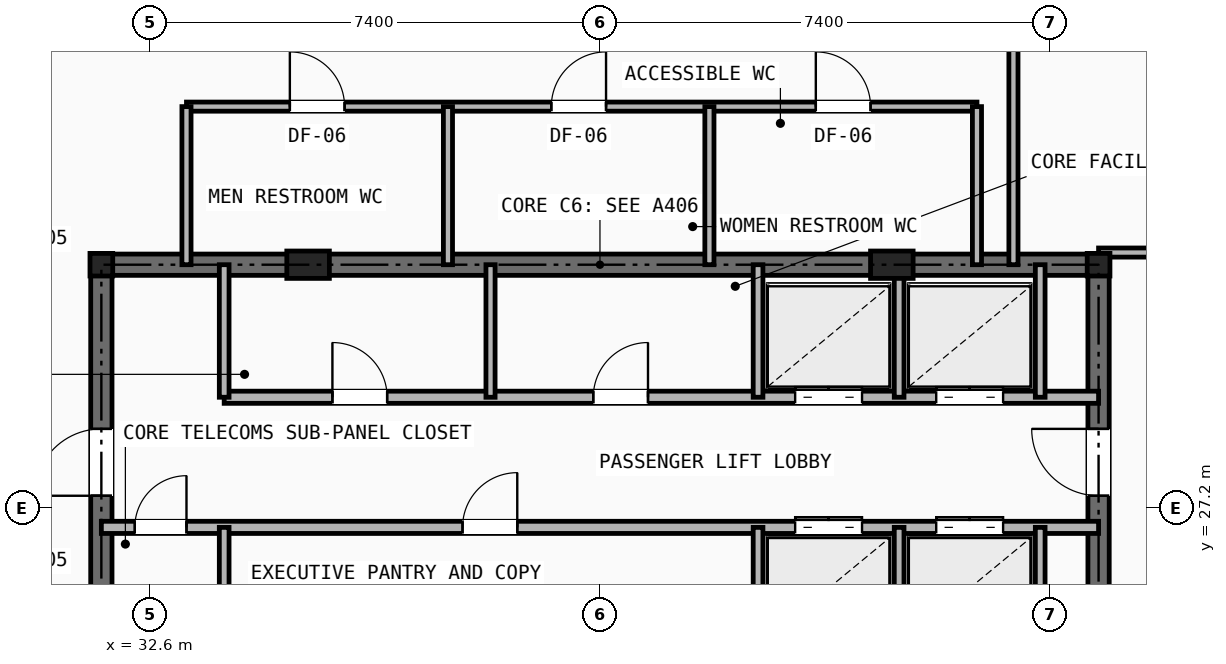
"""IFC4 building model, lengths in metres.
Left out: names, types, materials, properties, quantities, classifications, styles, units other than length and angle.
Written with IfcOpenShell. Run it as: python <this file> out.ifc"""

import sys

from ifc_helpers import new_model, si_unit, direction, frame, frame_2d, origin, origin_2d, place, context, subcontext, project, spatial, rectangle, i_section, extrude, element, fill, save


model = new_model("IFC4")
c1 = context("Model", 3, precision=1e-05, world=origin(), true_north=direction((0.0, 1.0)))
c2 = subcontext(c1, "Body", "Model", "MODEL_VIEW")
j1 = project(units=[si_unit("LENGTHUNIT", "METRE"), si_unit("PLANEANGLEUNIT", "RADIAN")], contexts=[c1])
p1 = place(None, origin())
s1 = spatial("IfcSite", under=j1, at=p1, CompositionType="ELEMENT")
p2 = place(p1, origin())
s2 = spatial("IfcBuilding", under=s1, at=p2, CompositionType="ELEMENT")
p3 = place(p2, frame((0.0, 0.0, 208.4)))
s3 = spatial("IfcBuildingStorey", under=s2, at=p3, CompositionType="ELEMENT", Elevation=208.4)
for number, where, z_axis, x_axis in (
    (1, (31.8, 31.2, 0.0), (0.0, 0.0, 1.0), (1.0, 0.0, 0.0)),
    (2, (48.2, 31.2, 0.0), (0.0, 0.0, 1.0), (1.0, 0.0, 0.0)),
):
    element("IfcColumn", number, at=place(p3, frame(where, z_axis=z_axis, x_axis=x_axis)), inside=s3, PredefinedType="COLUMN", context=c2, shape_type="SweptSolid", body=[
        extrude(i_section(OverallWidth=0.374, OverallDepth=0.372, WebThickness=0.016, FlangeThickness=0.026, at=origin_2d()), origin(), (0.0, 0.0, 1.0), 3.5),
    ])
for number, where, z_axis, x_axis in (
    (3, (35.2, 31.2, 0.0), (0.0, 0.0, 1.0), (1.0, 0.0, 0.0)),
    (4, (44.8, 31.2, 0.0), (0.0, 0.0, 1.0), (1.0, 0.0, 0.0)),
):
    element("IfcColumn", number, at=place(p3, frame(where, z_axis=z_axis, x_axis=x_axis)), inside=s3, PredefinedType="PILASTER", context=c2, shape_type="SweptSolid", body=[
        extrude(rectangle(XDim=0.7, YDim=0.45, at=origin_2d()), origin(), (0.0, 0.0, 1.0), 3.5),
    ])
p4 = place(p3, frame((31.8, 31.2, 0.0), z_axis=(0.0, 0.0, 1.0), x_axis=(1.0, 0.0, 0.0)))
e5 = element("IfcWall", 5, at=p4, inside=s3, PredefinedType="SHEAR", context=c2, shape_type="SweptSolid", body=[
    extrude(rectangle(XDim=16.4, YDim=0.35, at=frame_2d((8.2, 0.0))), origin(), (0.0, 0.0, 1.0), 3.25),
])
p5 = place(p3, frame((31.8, 16.4, 0.0), z_axis=(0.0, 0.0, 1.0), x_axis=(0.0, 1.0, 0.0)))
e6 = element("IfcWall", 6, at=p5, inside=s3, PredefinedType="SHEAR", context=c2, shape_type="SweptSolid", body=[
    extrude(rectangle(XDim=14.8, YDim=0.35, at=frame_2d((7.4, 0.0))), origin(), (0.0, 0.0, 1.0), 3.25),
])
p6 = place(p5, frame((11.0, 0.0, 0.0)))
e7 = element("IfcOpeningElement", 7, at=p6, cuts=e6, PredefinedType="OPENING", context=c2, shape_type="SweptSolid", body=[
    extrude(rectangle(XDim=1.1, YDim=2.15, at=frame_2d((0.55, 1.075))), frame((0.0, 0.185, 0.0), z_axis=(0.0, -1.0, 0.0), x_axis=(1.0, 0.0, 0.0)), (0.0, 0.0, 1.0), 0.37),
])
p7 = place(p3, frame((48.2, 16.4, 0.0), z_axis=(0.0, 0.0, 1.0), x_axis=(0.0, 1.0, 0.0)))
e8 = element("IfcWall", 8, at=p7, inside=s3, PredefinedType="SHEAR", context=c2, shape_type="SweptSolid", body=[
    extrude(rectangle(XDim=14.8, YDim=0.35, at=frame_2d((7.4, 0.0))), origin(), (0.0, 0.0, 1.0), 3.25),
])
p8 = place(p7, frame((11.0, 0.0, 0.0)))
e9 = element("IfcOpeningElement", 9, at=p8, cuts=e8, PredefinedType="OPENING", context=c2, shape_type="SweptSolid", body=[
    extrude(rectangle(XDim=1.1, YDim=2.15, at=frame_2d((0.55, 1.075))), frame((0.0, 0.185, 0.0), z_axis=(0.0, -1.0, 0.0), x_axis=(1.0, 0.0, 0.0)), (0.0, 0.0, 1.0), 0.37),
])
p9 = place(p3, frame((33.82, 29.02, 0.0), z_axis=(0.0, 0.0, 1.0), x_axis=(1.0, 0.0, 0.0)))
e10 = element("IfcWall", 10, at=p9, inside=s3, PredefinedType="SOLIDWALL", context=c2, shape_type="SweptSolid", body=[
    extrude(rectangle(XDim=14.38, YDim=0.2, at=frame_2d((7.19, 0.0))), origin(), (0.0, 0.0, 1.0), 2.705),
])
p10 = place(p9, frame((1.78, 0.0, 0.0)))
e11 = element("IfcOpeningElement", 11, at=p10, cuts=e10, PredefinedType="OPENING", context=c2, shape_type="SweptSolid", body=[
    extrude(rectangle(XDim=0.9, YDim=2.1, at=frame_2d((0.45, 1.05))), frame((0.0, 0.11, 0.0), z_axis=(0.0, -1.0, 0.0), x_axis=(1.0, 0.0, 0.0)), (0.0, 0.0, 1.0), 0.22),
])
p11 = place(p9, frame((6.07, 0.0, 0.0)))
e12 = element("IfcOpeningElement", 12, at=p11, cuts=e10, PredefinedType="OPENING", context=c2, shape_type="SweptSolid", body=[
    extrude(rectangle(XDim=0.9, YDim=2.1, at=frame_2d((0.45, 1.05))), frame((0.0, 0.11, 0.0), z_axis=(0.0, -1.0, 0.0), x_axis=(1.0, 0.0, 0.0)), (0.0, 0.0, 1.0), 0.22),
])
p12 = place(p9, frame((9.39, 0.0, 0.0)))
e13 = element("IfcOpeningElement", 13, at=p12, cuts=e10, PredefinedType="OPENING", context=c2, shape_type="SweptSolid", body=[
    extrude(rectangle(XDim=1.1, YDim=2.15, at=frame_2d((0.55, 1.075))), frame((0.0, 0.11, 0.0), z_axis=(0.0, -1.0, 0.0), x_axis=(1.0, 0.0, 0.0)), (0.0, 0.0, 1.0), 0.22),
])
p13 = place(p9, frame((11.71, 0.0, 0.0)))
e14 = element("IfcOpeningElement", 14, at=p13, cuts=e10, PredefinedType="OPENING", context=c2, shape_type="SweptSolid", body=[
    extrude(rectangle(XDim=1.1, YDim=2.15, at=frame_2d((0.55, 1.075))), frame((0.0, 0.11, 0.0), z_axis=(0.0, -1.0, 0.0), x_axis=(1.0, 0.0, 0.0)), (0.0, 0.0, 1.0), 0.22),
])
p14 = place(p3, frame((31.8, 26.88, 0.0), z_axis=(0.0, 0.0, 1.0), x_axis=(1.0, 0.0, 0.0)))
e15 = element("IfcWall", 15, at=p14, inside=s3, PredefinedType="SOLIDWALL", context=c2, shape_type="SweptSolid", body=[
    extrude(rectangle(XDim=16.4, YDim=0.2, at=frame_2d((8.2, 0.0))), origin(), (0.0, 0.0, 1.0), 2.705),
])
p15 = place(p14, frame((0.55, 0.0, 0.0)))
e16 = element("IfcOpeningElement", 16, at=p15, cuts=e15, PredefinedType="OPENING", context=c2, shape_type="SweptSolid", body=[
    extrude(rectangle(XDim=0.85, YDim=2.05, at=frame_2d((0.425, 1.025))), frame((0.0, 0.11, 0.0), z_axis=(0.0, -1.0, 0.0), x_axis=(1.0, 0.0, 0.0)), (0.0, 0.0, 1.0), 0.22),
])
p16 = place(p14, frame((5.94, 0.0, 0.0)))
e17 = element("IfcOpeningElement", 17, at=p16, cuts=e15, PredefinedType="OPENING", context=c2, shape_type="SweptSolid", body=[
    extrude(rectangle(XDim=0.9, YDim=2.1, at=frame_2d((0.45, 1.05))), frame((0.0, 0.11, 0.0), z_axis=(0.0, -1.0, 0.0), x_axis=(1.0, 0.0, 0.0)), (0.0, 0.0, 1.0), 0.22),
])
p17 = place(p14, frame((11.41, 0.0, 0.0)))
e18 = element("IfcOpeningElement", 18, at=p17, cuts=e15, PredefinedType="OPENING", context=c2, shape_type="SweptSolid", body=[
    extrude(rectangle(XDim=1.1, YDim=2.15, at=frame_2d((0.55, 1.075))), frame((0.0, 0.11, 0.0), z_axis=(0.0, -1.0, 0.0), x_axis=(1.0, 0.0, 0.0)), (0.0, 0.0, 1.0), 0.22),
])
p18 = place(p14, frame((13.73, 0.0, 0.0)))
e19 = element("IfcOpeningElement", 19, at=p18, cuts=e15, PredefinedType="OPENING", context=c2, shape_type="SweptSolid", body=[
    extrude(rectangle(XDim=1.1, YDim=2.15, at=frame_2d((0.55, 1.075))), frame((0.0, 0.11, 0.0), z_axis=(0.0, -1.0, 0.0), x_axis=(1.0, 0.0, 0.0)), (0.0, 0.0, 1.0), 0.22),
])
p19 = place(p3, frame((33.82, 29.02, 0.0), z_axis=(0.0, 0.0, 1.0), x_axis=(0.0, 1.0, 0.0)))
e20 = element("IfcWall", 20, at=p19, inside=s3, PredefinedType="SOLIDWALL", context=c2, shape_type="SweptSolid", body=[
    extrude(rectangle(XDim=2.18, YDim=0.16, at=frame_2d((1.09, 0.0))), origin(), (0.0, 0.0, 1.0), 2.705),
])
p20 = place(p3, frame((33.82, 24.8, 0.0), z_axis=(0.0, 0.0, 1.0), x_axis=(0.0, 1.0, 0.0)))
e21 = element("IfcWall", 21, at=p20, inside=s3, PredefinedType="SOLIDWALL", context=c2, shape_type="SweptSolid", body=[
    extrude(rectangle(XDim=2.08, YDim=0.16, at=frame_2d((1.04, 0.0))), origin(), (0.0, 0.0, 1.0), 3.25),
])
p21 = place(p3, frame((38.2, 29.02, 0.0), z_axis=(0.0, 0.0, 1.0), x_axis=(0.0, 1.0, 0.0)))
e22 = element("IfcWall", 22, at=p21, inside=s3, PredefinedType="PARTITIONING", context=c2, shape_type="SweptSolid", body=[
    extrude(rectangle(XDim=2.18, YDim=0.15, at=frame_2d((1.09, 0.0))), origin(), (0.0, 0.0, 1.0), 2.705),
])
for number, where, z_axis, x_axis in (
    (23, (42.6, 29.02, 0.0), (0.0, 0.0, 1.0), (0.0, 1.0, 0.0)),
    (24, (44.92, 29.02, 0.0), (0.0, 0.0, 1.0), (0.0, 1.0, 0.0)),
    (25, (47.24, 29.02, 0.0), (0.0, 0.0, 1.0), (0.0, 1.0, 0.0)),
):
    element("IfcWall", number, at=place(p3, frame(where, z_axis=z_axis, x_axis=x_axis)), inside=s3, PredefinedType="SOLIDWALL", context=c2, shape_type="SweptSolid", body=[
        extrude(rectangle(XDim=2.18, YDim=0.16, at=frame_2d((1.09, 0.0))), origin(), (0.0, 0.0, 1.0), 2.705),
    ])
for number, where, z_axis, x_axis in (
    (26, (42.6, 24.8, 0.0), (0.0, 0.0, 1.0), (0.0, 1.0, 0.0)),
    (27, (44.92, 24.8, 0.0), (0.0, 0.0, 1.0), (0.0, 1.0, 0.0)),
    (28, (47.24, 24.8, 0.0), (0.0, 0.0, 1.0), (0.0, 1.0, 0.0)),
):
    element("IfcWall", number, at=place(p3, frame(where, z_axis=z_axis, x_axis=x_axis)), inside=s3, PredefinedType="SOLIDWALL", context=c2, shape_type="SweptSolid", body=[
        extrude(rectangle(XDim=2.08, YDim=0.16, at=frame_2d((1.04, 0.0))), origin(), (0.0, 0.0, 1.0), 3.25),
    ])
p22 = place(p3, frame((33.2, 33.8, 0.0), z_axis=(0.0, 0.0, 1.0), x_axis=(1.0, 0.0, 0.0)))
e29 = element("IfcWall", 29, at=p22, inside=s3, PredefinedType="PARTITIONING", context=c2, shape_type="SweptSolid", body=[
    extrude(rectangle(XDim=13.0, YDim=0.15, at=frame_2d((6.5, 0.0))), origin(), (0.0, 0.0, 1.0), 3.25),
])
p23 = place(p22, frame((1.7, 0.0, 0.0)))
e30 = element("IfcOpeningElement", 30, at=p23, cuts=e29, PredefinedType="OPENING", context=c2, shape_type="SweptSolid", body=[
    extrude(rectangle(XDim=0.9, YDim=2.1, at=frame_2d((0.45, 1.05))), frame((0.0, 0.085, 0.0), z_axis=(0.0, -1.0, 0.0), x_axis=(1.0, 0.0, 0.0)), (0.0, 0.0, 1.0), 0.17),
])
p24 = place(p22, frame((6.0, 0.0, 0.0)))
e31 = element("IfcOpeningElement", 31, at=p24, cuts=e29, PredefinedType="OPENING", context=c2, shape_type="SweptSolid", body=[
    extrude(rectangle(XDim=0.9, YDim=2.1, at=frame_2d((0.45, 1.05))), frame((0.0, 0.085, 0.0), z_axis=(0.0, -1.0, 0.0), x_axis=(1.0, 0.0, 0.0)), (0.0, 0.0, 1.0), 0.17),
])
p25 = place(p22, frame((10.35, 0.0, 0.0)))
e32 = element("IfcOpeningElement", 32, at=p25, cuts=e29, PredefinedType="OPENING", context=c2, shape_type="SweptSolid", body=[
    extrude(rectangle(XDim=0.9, YDim=2.1, at=frame_2d((0.45, 1.05))), frame((0.0, 0.085, 0.0), z_axis=(0.0, -1.0, 0.0), x_axis=(1.0, 0.0, 0.0)), (0.0, 0.0, 1.0), 0.17),
])
for number, where, z_axis, x_axis in (
    (33, (33.2, 31.2, 0.0), (0.0, 0.0, 1.0), (0.0, 1.0, 0.0)),
    (34, (46.2, 31.2, 0.0), (0.0, 0.0, 1.0), (0.0, 1.0, 0.0)),
    (35, (37.5, 31.2, 0.0), (0.0, 0.0, 1.0), (0.0, 1.0, 0.0)),
    (36, (41.8, 31.2, 0.0), (0.0, 0.0, 1.0), (0.0, 1.0, 0.0)),
):
    element("IfcWall", number, at=place(p3, frame(where, z_axis=z_axis, x_axis=x_axis)), inside=s3, PredefinedType="PARTITIONING", context=c2, shape_type="SweptSolid", body=[
        extrude(rectangle(XDim=2.6, YDim=0.15, at=frame_2d((1.3, 0.0))), origin(), (0.0, 0.0, 1.0), 2.705),
    ])
p26 = place(p3, frame((46.8, 31.2, 0.0), z_axis=(0.0, 0.0, 1.0), x_axis=(0.0, 1.0, 0.0)))
e37 = element("IfcWall", 37, at=p26, inside=s3, PredefinedType="PARTITIONING", context=c2, shape_type="SweptSolid", body=[
    extrude(rectangle(XDim=4.5, YDim=0.15, at=frame_2d((2.25, 0.0))), origin(), (0.0, 0.0, 1.0), 2.705),
])
p27 = place(p3, frame((48.2, 31.4, 0.0), z_axis=(0.0, 0.0, 1.0), x_axis=(1.0, 0.0, 0.0)))
e38 = element("IfcWall", 38, at=p27, inside=s3, PredefinedType="PARTITIONING", context=c2, shape_type="SweptSolid", body=[
    extrude(rectangle(XDim=5.896, YDim=0.15, at=frame_2d((2.948, 0.0))), origin(), (0.0, 0.0, 1.0), 2.292),
])
p28 = place(p27, frame((1.4, 0.0, 0.0)))
e39 = element("IfcOpeningElement", 39, at=p28, cuts=e38, PredefinedType="OPENING", context=c2, shape_type="SweptSolid", body=[
    extrude(rectangle(XDim=0.95, YDim=2.1, at=frame_2d((0.475, 1.05))), frame((0.0, 0.085, 0.0), z_axis=(0.0, -1.0, 0.0), x_axis=(1.0, 0.0, 0.0)), (0.0, 0.0, 1.0), 0.17),
])
p29 = place(p15, origin())
e40 = element("IfcDoor", 40, at=p29, inside=s3, OperationType="SINGLE_SWING_RIGHT", PredefinedType="DOOR", context=c2, shape_type="SweptSolid", body=[
    extrude(rectangle(XDim=0.85, YDim=2.05, at=frame_2d((0.425, 1.025))), frame((0.0, 0.025, 0.0), z_axis=(0.0, -1.0, 0.0), x_axis=(1.0, 0.0, 0.0)), (0.0, 0.0, 1.0), 0.05),
])
fill(e16, e40)
p30 = place(p6, origin())
e41 = element("IfcDoor", 41, at=p30, inside=s3, OperationType="SINGLE_SWING_LEFT", PredefinedType="DOOR", context=c2, shape_type="SweptSolid", body=[
    extrude(rectangle(XDim=1.1, YDim=2.15, at=frame_2d((0.55, 1.075))), frame((0.0, 0.025, 0.0), z_axis=(0.0, -1.0, 0.0), x_axis=(1.0, 0.0, 0.0)), (0.0, 0.0, 1.0), 0.05),
])
fill(e7, e41)
p31 = place(p8, origin())
e42 = element("IfcDoor", 42, at=p31, inside=s3, OperationType="SINGLE_SWING_RIGHT", PredefinedType="DOOR", context=c2, shape_type="SweptSolid", body=[
    extrude(rectangle(XDim=1.1, YDim=2.15, at=frame_2d((0.55, 1.075))), frame((0.0, 0.025, 0.0), z_axis=(0.0, -1.0, 0.0), x_axis=(1.0, 0.0, 0.0)), (0.0, 0.0, 1.0), 0.05),
])
fill(e9, e42)
p32 = place(p10, origin())
e43 = element("IfcDoor", 43, at=p32, inside=s3, OperationType="SINGLE_SWING_LEFT", PredefinedType="DOOR", context=c2, shape_type="SweptSolid", body=[
    extrude(rectangle(XDim=0.9, YDim=2.1, at=frame_2d((0.45, 1.05))), frame((0.0, 0.025, 0.0), z_axis=(0.0, -1.0, 0.0), x_axis=(1.0, 0.0, 0.0)), (0.0, 0.0, 1.0), 0.05),
])
fill(e11, e43)
p33 = place(p11, origin())
e44 = element("IfcDoor", 44, at=p33, inside=s3, OperationType="SINGLE_SWING_RIGHT", PredefinedType="DOOR", context=c2, shape_type="SweptSolid", body=[
    extrude(rectangle(XDim=0.9, YDim=2.1, at=frame_2d((0.45, 1.05))), frame((0.0, 0.025, 0.0), z_axis=(0.0, -1.0, 0.0), x_axis=(1.0, 0.0, 0.0)), (0.0, 0.0, 1.0), 0.05),
])
fill(e12, e44)
p34 = place(p16, origin())
e45 = element("IfcDoor", 45, at=p34, inside=s3, OperationType="SINGLE_SWING_RIGHT", PredefinedType="DOOR", context=c2, shape_type="SweptSolid", body=[
    extrude(rectangle(XDim=0.9, YDim=2.1, at=frame_2d((0.45, 1.05))), frame((0.0, 0.025, 0.0), z_axis=(0.0, -1.0, 0.0), x_axis=(1.0, 0.0, 0.0)), (0.0, 0.0, 1.0), 0.05),
])
fill(e17, e45)
p35 = place(p12, origin())
e46 = element("IfcDoor", 46, at=p35, inside=s3, OperationType="DOUBLE_DOOR_SLIDING", PredefinedType="DOOR", context=c2, shape_type="SweptSolid", body=[
    extrude(rectangle(XDim=1.1, YDim=2.15, at=frame_2d((0.55, 1.075))), frame((0.0, 0.025, 0.0), z_axis=(0.0, -1.0, 0.0), x_axis=(1.0, 0.0, 0.0)), (0.0, 0.0, 1.0), 0.05),
])
fill(e13, e46)
p36 = place(p13, origin())
e47 = element("IfcDoor", 47, at=p36, inside=s3, OperationType="DOUBLE_DOOR_SLIDING", PredefinedType="DOOR", context=c2, shape_type="SweptSolid", body=[
    extrude(rectangle(XDim=1.1, YDim=2.15, at=frame_2d((0.55, 1.075))), frame((0.0, 0.025, 0.0), z_axis=(0.0, -1.0, 0.0), x_axis=(1.0, 0.0, 0.0)), (0.0, 0.0, 1.0), 0.05),
])
fill(e14, e47)
p37 = place(p17, origin())
e48 = element("IfcDoor", 48, at=p37, inside=s3, OperationType="DOUBLE_DOOR_SLIDING", PredefinedType="DOOR", context=c2, shape_type="SweptSolid", body=[
    extrude(rectangle(XDim=1.1, YDim=2.15, at=frame_2d((0.55, 1.075))), frame((0.0, 0.025, 0.0), z_axis=(0.0, -1.0, 0.0), x_axis=(1.0, 0.0, 0.0)), (0.0, 0.0, 1.0), 0.05),
])
fill(e18, e48)
p38 = place(p18, origin())
e49 = element("IfcDoor", 49, at=p38, inside=s3, OperationType="DOUBLE_DOOR_SLIDING", PredefinedType="DOOR", context=c2, shape_type="SweptSolid", body=[
    extrude(rectangle(XDim=1.1, YDim=2.15, at=frame_2d((0.55, 1.075))), frame((0.0, 0.025, 0.0), z_axis=(0.0, -1.0, 0.0), x_axis=(1.0, 0.0, 0.0)), (0.0, 0.0, 1.0), 0.05),
])
fill(e19, e49)
p39 = place(p23, origin())
e50 = element("IfcDoor", 50, at=p39, inside=s3, OperationType="SINGLE_SWING_LEFT", PredefinedType="DOOR", context=c2, shape_type="SweptSolid", body=[
    extrude(rectangle(XDim=0.9, YDim=2.1, at=frame_2d((0.45, 1.05))), frame((0.0, 0.025, 0.0), z_axis=(0.0, -1.0, 0.0), x_axis=(1.0, 0.0, 0.0)), (0.0, 0.0, 1.0), 0.05),
])
fill(e30, e50)
p40 = place(p24, origin())
e51 = element("IfcDoor", 51, at=p40, inside=s3, OperationType="SINGLE_SWING_RIGHT", PredefinedType="DOOR", context=c2, shape_type="SweptSolid", body=[
    extrude(rectangle(XDim=0.9, YDim=2.1, at=frame_2d((0.45, 1.05))), frame((0.0, 0.025, 0.0), z_axis=(0.0, -1.0, 0.0), x_axis=(1.0, 0.0, 0.0)), (0.0, 0.0, 1.0), 0.05),
])
fill(e31, e51)
p41 = place(p25, origin())
e52 = element("IfcDoor", 52, at=p41, inside=s3, OperationType="SINGLE_SWING_LEFT", PredefinedType="DOOR", context=c2, shape_type="SweptSolid", body=[
    extrude(rectangle(XDim=0.9, YDim=2.1, at=frame_2d((0.45, 1.05))), frame((0.0, 0.025, 0.0), z_axis=(0.0, -1.0, 0.0), x_axis=(1.0, 0.0, 0.0)), (0.0, 0.0, 1.0), 0.05),
])
fill(e32, e52)
save(model, sys.argv[1])
